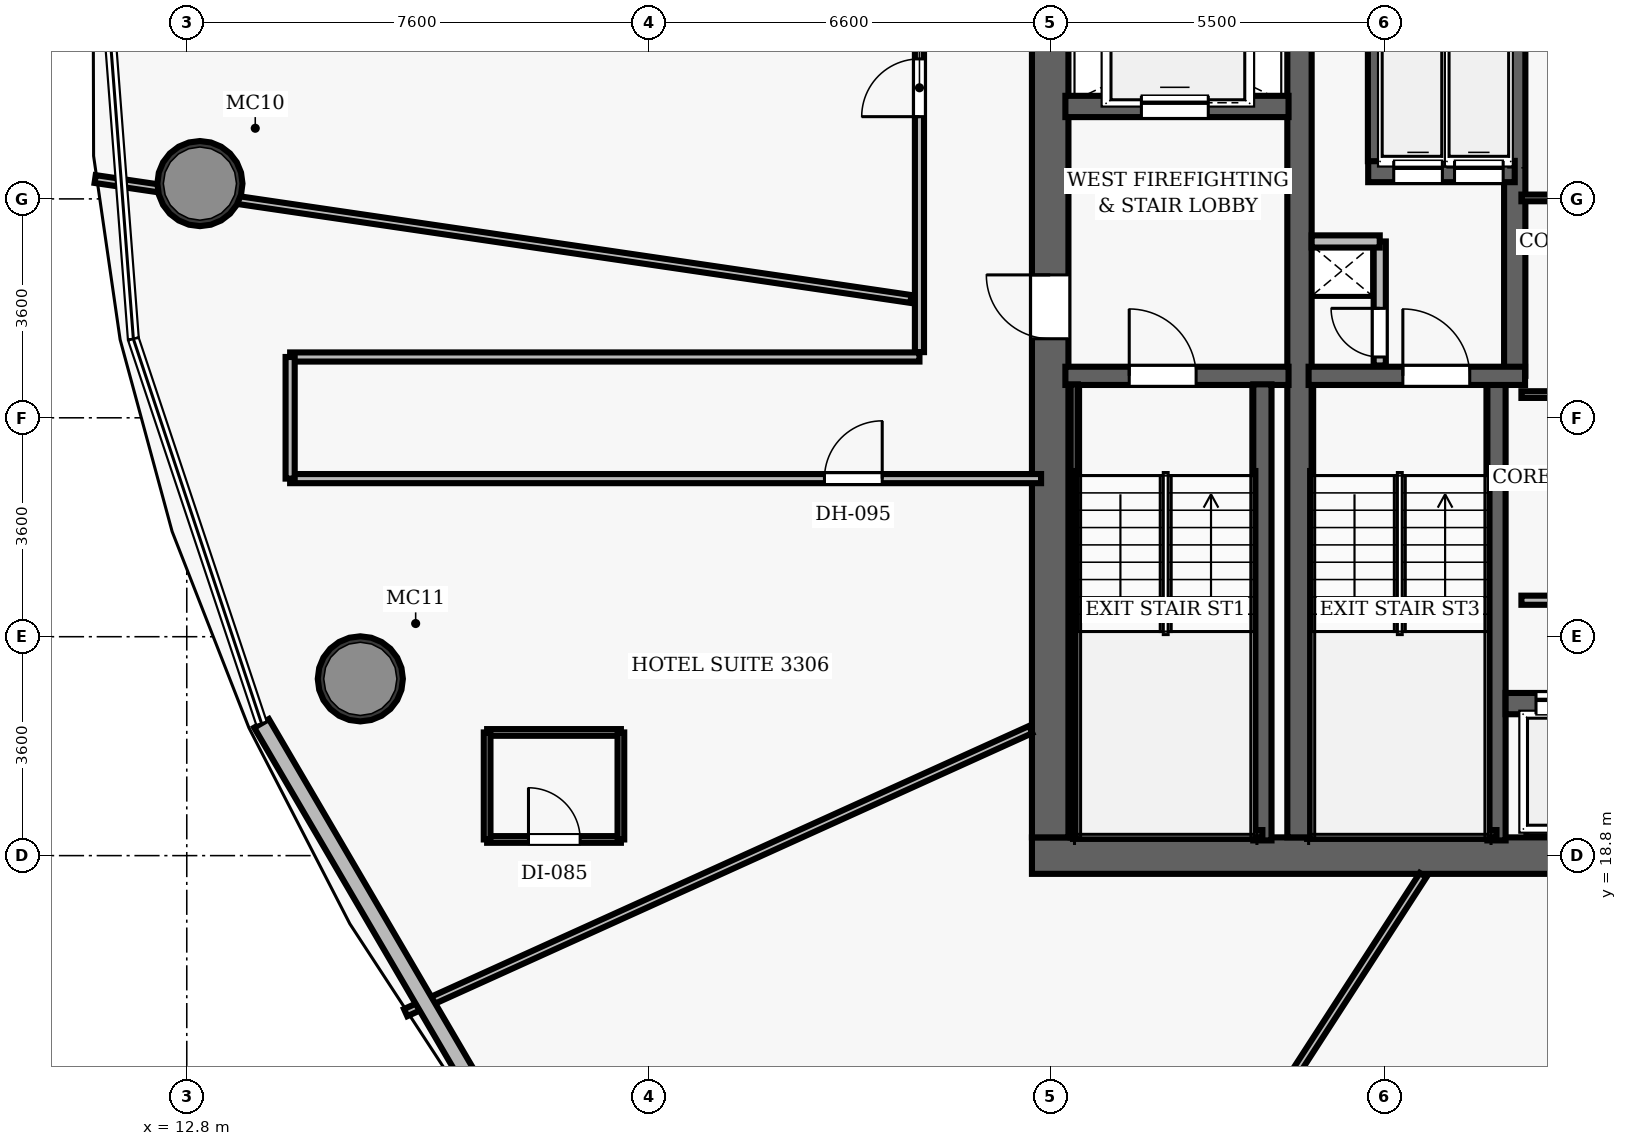
"""IFC4 building model, lengths in metres.
Left out: names, types, materials, properties, quantities, classifications, styles, units other than length and angle.
Written with IfcOpenShell. Run it as: python <this file> out.ifc"""

import sys

from ifc_helpers import new_model, si_unit, direction, frame, frame_2d, origin, origin_2d, place, context, subcontext, project, spatial, rectangle, hollow_circle, extrude, element, fill, save


model = new_model("IFC4")
c1 = context("Model", 3, precision=1e-05, world=origin(), true_north=direction((0.0, 1.0)))
c2 = subcontext(c1, "Body", "Model", "MODEL_VIEW")
j1 = project(units=[si_unit("LENGTHUNIT", "METRE"), si_unit("PLANEANGLEUNIT", "RADIAN")], contexts=[c1])
p1 = place(None, origin())
s1 = spatial("IfcSite", under=j1, at=p1, CompositionType="ELEMENT")
p2 = place(p1, origin())
s2 = spatial("IfcBuilding", under=s1, at=p2, CompositionType="ELEMENT")
p3 = place(p2, frame((0.0, 0.0, 134.3)))
s3 = spatial("IfcBuildingStorey", under=s2, at=p3, CompositionType="ELEMENT", Elevation=134.3)
p4 = place(p3, frame((26.7, 18.8, 0.0), z_axis=(0.0, 0.0, 1.0), x_axis=(1.0, 0.0, 0.0)))
e1 = element("IfcWall", 1, at=p4, inside=s3, PredefinedType="SHEAR", context=c2, shape_type="SweptSolid", body=[
    extrude(rectangle(XDim=22.6, YDim=0.6, at=frame_2d((11.3, 0.0))), origin(), (0.0, 0.0, 1.0), 3.5),
])
p5 = place(p4, frame((14.52, 0.0, 0.0)))
e2 = element("IfcOpeningElement", 2, at=p5, cuts=e1, PredefinedType="OPENING", context=c2, shape_type="SweptSolid", body=[
    extrude(rectangle(XDim=1.05, YDim=2.15, at=frame_2d((0.525, 1.075))), frame((0.0, 0.31, 0.0), z_axis=(0.0, -1.0, 0.0), x_axis=(1.0, 0.0, 0.0)), (0.0, 0.0, 1.0), 0.62),
])
p6 = place(p3, frame((27.0, 19.1, 0.0), z_axis=(0.0, 0.0, 1.0), x_axis=(0.0, 1.0, 0.0)))
e3 = element("IfcWall", 3, at=p6, inside=s3, PredefinedType="SHEAR", context=c2, shape_type="SweptSolid", body=[
    extrude(rectangle(XDim=13.8, YDim=0.6, at=frame_2d((6.9, 0.0))), origin(), (0.0, 0.0, 1.0), 3.5),
])
p7 = place(p6, frame((8.2, 0.0, 0.0)))
e4 = element("IfcOpeningElement", 4, at=p7, cuts=e3, PredefinedType="OPENING", context=c2, shape_type="SweptSolid", body=[
    extrude(rectangle(XDim=1.05, YDim=2.15, at=frame_2d((0.525, 1.075))), frame((0.0, 0.31, 0.0), z_axis=(0.0, -1.0, 0.0), x_axis=(1.0, 0.0, 0.0)), (0.0, 0.0, 1.0), 0.62),
])
p8 = place(p3, frame((31.1, 19.1, 0.0), z_axis=(0.0, 0.0, 1.0), x_axis=(0.0, 1.0, 0.0)))
e5 = element("IfcWall", 5, at=p8, inside=s3, PredefinedType="SHEAR", context=c2, shape_type="SweptSolid", body=[
    extrude(rectangle(XDim=13.8, YDim=0.4, at=frame_2d((6.9, 0.0))), origin(), (0.0, 0.0, 1.0), 3.5),
])
for number, where, z_axis, x_axis in (
    (6, (13.016, 29.852, 0.0), (0.0, 0.0, 1.0), (1.0, 0.0, 0.0)),
    (7, (15.654, 21.707, 0.0), (0.0, 0.0, 1.0), (1.0, 0.0, 0.0)),
):
    element("IfcColumn", number, at=place(p3, frame(where, z_axis=z_axis, x_axis=x_axis)), inside=s3, PredefinedType="COLUMN", context=c2, shape_type="SweptSolid", body=[
        extrude(hollow_circle(Radius=0.7, WallThickness=0.055, at=origin_2d()), origin(), (0.0, 0.0, 1.0), 3.5),
    ])
p9 = place(p3, frame((27.25, 26.69, 0.0), z_axis=(0.0, 0.0, 1.0), x_axis=(1.0, 0.0, 0.0)))
e8 = element("IfcWall", 8, at=p9, inside=s3, PredefinedType="SHEAR", context=c2, shape_type="SweptSolid", body=[
    extrude(rectangle(XDim=3.67, YDim=0.3, at=frame_2d((1.835, 0.0))), origin(), (0.0, 0.0, 1.0), 3.5),
])
p10 = place(p9, frame((1.05, 0.0, 0.0)))
e9 = element("IfcOpeningElement", 9, at=p10, cuts=e8, PredefinedType="OPENING", context=c2, shape_type="SweptSolid", body=[
    extrude(rectangle(XDim=1.1, YDim=2.15, at=frame_2d((0.55, 1.075))), frame((0.0, 0.16, 0.0), z_axis=(0.0, -1.0, 0.0), x_axis=(1.0, 0.0, 0.0)), (0.0, 0.0, 1.0), 0.32),
])
p11 = place(p3, frame((30.49, 19.05, 0.0), z_axis=(0.0, 0.0, 1.0), x_axis=(0.0, 1.0, 0.0)))
e10 = element("IfcWall", 10, at=p11, inside=s3, PredefinedType="SHEAR", context=c2, shape_type="SweptSolid", body=[
    extrude(rectangle(XDim=7.5, YDim=0.3, at=frame_2d((3.75, 0.0))), origin(), (0.0, 0.0, 1.0), 3.5),
])
p12 = place(p3, frame((27.395, 19.1, 0.0), z_axis=(0.0, 0.0, 1.0), x_axis=(0.0, 1.0, 0.0)))
e11 = element("IfcWall", 11, at=p12, inside=s3, PredefinedType="SHEAR", context=c2, shape_type="SweptSolid", body=[
    extrude(rectangle(XDim=7.45, YDim=0.12, at=frame_2d((3.725, 0.0))), origin(), (0.0, 0.0, 1.0), 3.5),
])
p13 = place(p3, frame((27.395, 19.16, 0.0), z_axis=(0.0, 0.0, 1.0), x_axis=(1.0, 0.0, 0.0)))
e12 = element("IfcWall", 12, at=p13, inside=s3, PredefinedType="SHEAR", context=c2, shape_type="SweptSolid", body=[
    extrude(rectangle(XDim=3.095, YDim=0.12, at=frame_2d((1.547, 0.0))), origin(), (0.0, 0.0, 1.0), 3.5),
])
p14 = place(p3, frame((27.25, 31.12, 0.0), z_axis=(0.0, 0.0, 1.0), x_axis=(1.0, 0.0, 0.0)))
e13 = element("IfcWall", 13, at=p14, inside=s3, PredefinedType="SHEAR", context=c2, shape_type="SweptSolid", body=[
    extrude(rectangle(XDim=3.67, YDim=0.35, at=frame_2d((1.835, 0.0))), origin(), (0.0, 0.0, 1.0), 2.675),
])
p15 = place(p14, frame((1.25, 0.0, 0.0)))
e14 = element("IfcOpeningElement", 14, at=p15, cuts=e13, PredefinedType="OPENING", context=c2, shape_type="SweptSolid", body=[
    extrude(rectangle(XDim=1.1, YDim=2.15, at=frame_2d((0.55, 1.075))), frame((0.0, 0.185, 0.0), z_axis=(0.0, -1.0, 0.0), x_axis=(1.0, 0.0, 0.0)), (0.0, 0.0, 1.0), 0.37),
])
p16 = place(p3, frame((34.34, 19.05, 0.0), z_axis=(0.0, 0.0, 1.0), x_axis=(0.0, 1.0, 0.0)))
e15 = element("IfcWall", 15, at=p16, inside=s3, PredefinedType="SHEAR", context=c2, shape_type="SweptSolid", body=[
    extrude(rectangle(XDim=7.5, YDim=0.3, at=frame_2d((3.75, 0.0))), origin(), (0.0, 0.0, 1.0), 3.5),
])
p17 = place(p3, frame((34.64, 26.69, 0.0), z_axis=(0.0, 0.0, 1.0), x_axis=(0.0, 1.0, 0.0)))
e16 = element("IfcWall", 16, at=p17, inside=s3, PredefinedType="SHEAR", context=c2, shape_type="SweptSolid", body=[
    extrude(rectangle(XDim=6.26, YDim=0.35, at=frame_2d((3.13, 0.0))), origin(), (0.0, 0.0, 1.0), 3.5),
])
p18 = place(p3, frame((31.25, 26.69, 0.0), z_axis=(0.0, 0.0, 1.0), x_axis=(1.0, 0.0, 0.0)))
e17 = element("IfcWall", 17, at=p18, inside=s3, PredefinedType="SHEAR", context=c2, shape_type="SweptSolid", body=[
    extrude(rectangle(XDim=3.56, YDim=0.3, at=frame_2d((1.78, 0.0))), origin(), (0.0, 0.0, 1.0), 3.5),
])
p19 = place(p18, frame((1.55, 0.0, 0.0)))
e18 = element("IfcOpeningElement", 18, at=p19, cuts=e17, PredefinedType="OPENING", context=c2, shape_type="SweptSolid", body=[
    extrude(rectangle(XDim=1.1, YDim=2.15, at=frame_2d((0.55, 1.075))), frame((0.0, 0.16, 0.0), z_axis=(0.0, -1.0, 0.0), x_axis=(1.0, 0.0, 0.0)), (0.0, 0.0, 1.0), 0.32),
])
p20 = place(p3, frame((31.3, 19.16, 0.0), z_axis=(0.0, 0.0, 1.0), x_axis=(1.0, 0.0, 0.0)))
e19 = element("IfcWall", 19, at=p20, inside=s3, PredefinedType="SHEAR", context=c2, shape_type="SweptSolid", body=[
    extrude(rectangle(XDim=3.04, YDim=0.12, at=frame_2d((1.52, 0.0))), origin(), (0.0, 0.0, 1.0), 3.5),
])
p21 = place(p3, frame((32.23, 30.05, 0.0), z_axis=(0.0, 0.0, 1.0), x_axis=(1.0, 0.0, 0.0)))
e20 = element("IfcWall", 20, at=p21, inside=s3, PredefinedType="SHEAR", context=c2, shape_type="SweptSolid", body=[
    extrude(rectangle(XDim=2.41, YDim=0.35, at=frame_2d((1.205, 0.0))), origin(), (0.0, 0.0, 1.0), 2.675),
])
p22 = place(p21, frame((0.42, 0.0, 0.0)))
e21 = element("IfcOpeningElement", 21, at=p22, cuts=e20, PredefinedType="OPENING", context=c2, shape_type="SweptSolid", body=[
    extrude(rectangle(XDim=0.8, YDim=2.15, at=frame_2d((0.4, 1.075))), frame((0.0, 0.185, 0.0), z_axis=(0.0, -1.0, 0.0), x_axis=(1.0, 0.0, 0.0)), (0.0, 0.0, 1.0), 0.37),
])
p23 = place(p21, frame((1.42, 0.0, 0.0)))
e22 = element("IfcOpeningElement", 22, at=p23, cuts=e20, PredefinedType="OPENING", context=c2, shape_type="SweptSolid", body=[
    extrude(rectangle(XDim=0.8, YDim=2.15, at=frame_2d((0.4, 1.075))), frame((0.0, 0.185, 0.0), z_axis=(0.0, -1.0, 0.0), x_axis=(1.0, 0.0, 0.0)), (0.0, 0.0, 1.0), 0.37),
])
p24 = place(p3, frame((32.4, 30.22, 0.0), z_axis=(0.0, 0.0, 1.0), x_axis=(0.0, 1.0, 0.0)))
e23 = element("IfcWall", 23, at=p24, inside=s3, PredefinedType="SHEAR", context=c2, shape_type="SweptSolid", body=[
    extrude(rectangle(XDim=2.73, YDim=0.35, at=frame_2d((1.365, 0.0))), origin(), (0.0, 0.0, 1.0), 2.675),
])
p25 = place(p3, frame((32.42, 26.86, 0.0), z_axis=(0.0, 0.0, 1.0), x_axis=(0.0, 1.0, 0.0)))
e24 = element("IfcWall", 24, at=p25, inside=s3, PredefinedType="PARTITIONING", context=c2, shape_type="SweptSolid", body=[
    extrude(rectangle(XDim=2.04, YDim=0.2, at=frame_2d((1.02, 0.0))), origin(), (0.0, 0.0, 1.0), 2.675),
])
p26 = place(p25, frame((0.14, 0.0, 0.0)))
e25 = element("IfcOpeningElement", 25, at=p26, cuts=e24, PredefinedType="OPENING", context=c2, shape_type="SweptSolid", body=[
    extrude(rectangle(XDim=0.8, YDim=2.05, at=frame_2d((0.4, 1.025))), frame((0.0, 0.11, 0.0), z_axis=(0.0, -1.0, 0.0), x_axis=(1.0, 0.0, 0.0)), (0.0, 0.0, 1.0), 0.22),
])
p27 = place(p3, frame((31.3, 28.9, 0.0), z_axis=(0.0, 0.0, 1.0), x_axis=(1.0, 0.0, 0.0)))
e26 = element("IfcWall", 26, at=p27, inside=s3, PredefinedType="PARTITIONING", context=c2, shape_type="SweptSolid", body=[
    extrude(rectangle(XDim=1.12, YDim=0.2, at=frame_2d((0.56, 0.0))), origin(), (0.0, 0.0, 1.0), 2.675),
])
p28 = place(p3, frame((34.49, 21.3, 0.0), z_axis=(0.0, 0.0, 1.0), x_axis=(1.0, 0.0, 0.0)))
e27 = element("IfcWall", 27, at=p28, inside=s3, PredefinedType="SHEAR", context=c2, shape_type="SweptSolid", body=[
    extrude(rectangle(XDim=6.68, YDim=0.35, at=frame_2d((3.34, 0.0))), origin(), (0.0, 0.0, 1.0), 2.675),
])
p29 = place(p28, frame((0.5, 0.0, 0.0)))
e28 = element("IfcOpeningElement", 28, at=p29, cuts=e27, PredefinedType="OPENING", context=c2, shape_type="SweptSolid", body=[
    extrude(rectangle(XDim=0.9, YDim=2.15, at=frame_2d((0.45, 1.075))), frame((0.0, 0.185, 0.0), z_axis=(0.0, -1.0, 0.0), x_axis=(1.0, 0.0, 0.0)), (0.0, 0.0, 1.0), 0.37),
])
p30 = place(p28, frame((2.58, 0.0, 0.0)))
e29 = element("IfcOpeningElement", 29, at=p30, cuts=e27, PredefinedType="OPENING", context=c2, shape_type="SweptSolid", body=[
    extrude(rectangle(XDim=0.9, YDim=2.15, at=frame_2d((0.45, 1.075))), frame((0.0, 0.185, 0.0), z_axis=(0.0, -1.0, 0.0), x_axis=(1.0, 0.0, 0.0)), (0.0, 0.0, 1.0), 0.37),
])
p31 = place(p28, frame((4.66, 0.0, 0.0)))
e30 = element("IfcOpeningElement", 30, at=p31, cuts=e27, PredefinedType="OPENING", context=c2, shape_type="SweptSolid", body=[
    extrude(rectangle(XDim=0.9, YDim=2.15, at=frame_2d((0.45, 1.075))), frame((0.0, 0.185, 0.0), z_axis=(0.0, -1.0, 0.0), x_axis=(1.0, 0.0, 0.0)), (0.0, 0.0, 1.0), 0.37),
])
p32 = place(p3, frame((34.75, 23.0, 0.0), z_axis=(0.0, 0.0, 1.0), x_axis=(1.0, 0.0, 0.0)))
e31 = element("IfcWall", 31, at=p32, inside=s3, PredefinedType="PARTITIONING", context=c2, shape_type="SweptSolid", body=[
    extrude(rectangle(XDim=6.25, YDim=0.15, at=frame_2d((3.125, 0.0))), origin(), (0.0, 0.0, 1.0), 2.675),
])
for number, where, z_axis, x_axis in (
    (32, (34.75, 26.382, 0.0), (0.0, 0.0, 1.0), (1.0, 0.0, 0.0)),
    (33, (34.75, 29.616, 0.0), (0.0, 0.0, 1.0), (1.0, 0.0, 0.0)),
):
    element("IfcWall", number, at=place(p3, frame(where, z_axis=z_axis, x_axis=x_axis)), inside=s3, PredefinedType="PARTITIONING", context=c2, shape_type="SweptSolid", body=[
        extrude(rectangle(XDim=6.25, YDim=0.11, at=frame_2d((3.125, 0.0))), origin(), (0.0, 0.0, 1.0), 2.675),
    ])
p33 = place(p3, frame((24.85, 27.08, 0.0), z_axis=(0.0, 0.0, 1.0), x_axis=(0.0, 1.0, 0.0)))
e34 = element("IfcWall", 34, at=p33, inside=s3, PredefinedType="PARTITIONING", context=c2, shape_type="SweptSolid", body=[
    extrude(rectangle(XDim=8.12, YDim=0.15, at=frame_2d((4.06, 0.0))), origin(), (0.0, 0.0, 1.0), 2.675),
])
p34 = place(p33, frame((3.872, 0.0, 0.0)))
e35 = element("IfcOpeningElement", 35, at=p34, cuts=e34, PredefinedType="OPENING", context=c2, shape_type="SweptSolid", body=[
    extrude(rectangle(XDim=0.95, YDim=2.15, at=frame_2d((0.475, 1.075))), frame((0.0, 0.085, 0.0), z_axis=(0.0, -1.0, 0.0), x_axis=(1.0, 0.0, 0.0)), (0.0, 0.0, 1.0), 0.17),
])
p35 = place(p3, frame((14.5, 27.0, 0.0), z_axis=(0.0, 0.0, 1.0), x_axis=(1.0, 0.0, 0.0)))
e36 = element("IfcWall", 36, at=p35, inside=s3, PredefinedType="PARTITIONING", context=c2, shape_type="SweptSolid", body=[
    extrude(rectangle(XDim=10.35, YDim=0.15, at=frame_2d((5.175, 0.0))), origin(), (0.0, 0.0, 1.0), 2.675),
])
p36 = place(p3, frame((14.5, 25.0, 0.0), z_axis=(0.0, 0.0, 1.0), x_axis=(1.0, 0.0, 0.0)))
e37 = element("IfcWall", 37, at=p36, inside=s3, PredefinedType="PARTITIONING", context=c2, shape_type="SweptSolid", body=[
    extrude(rectangle(XDim=12.35, YDim=0.15, at=frame_2d((6.175, 0.0))), origin(), (0.0, 0.0, 1.0), 2.675),
])
p37 = place(p36, frame((8.788, 0.0, 0.0)))
e38 = element("IfcOpeningElement", 38, at=p37, cuts=e37, PredefinedType="OPENING", context=c2, shape_type="SweptSolid", body=[
    extrude(rectangle(XDim=0.95, YDim=2.15, at=frame_2d((0.475, 1.075))), frame((0.0, 0.085, 0.0), z_axis=(0.0, -1.0, 0.0), x_axis=(1.0, 0.0, 0.0)), (0.0, 0.0, 1.0), 0.17),
])
p38 = place(p3, frame((14.5, 25.0, 0.0), z_axis=(0.0, 0.0, 1.0), x_axis=(0.0, 1.0, 0.0)))
e39 = element("IfcWall", 39, at=p38, inside=s3, PredefinedType="PARTITIONING", context=c2, shape_type="SweptSolid", body=[
    extrude(rectangle(XDim=2.0, YDim=0.15, at=frame_2d((1.0, 0.0))), origin(), (0.0, 0.0, 1.0), 2.675),
])
p39 = place(p3, frame((24.71, 27.954, 0.0), z_axis=(0.0, 0.0, 1.0), x_axis=(-0.989363707992, 0.145462893234, 0.0)))
e40 = element("IfcWall", 40, at=p39, inside=s3, PredefinedType="PARTITIONING", context=c2, shape_type="SweptSolid", body=[
    extrude(rectangle(XDim=13.561, YDim=0.13, at=frame_2d((6.781, 0.0))), origin(), (0.0, 0.0, 1.0), 2.675),
])
p40 = place(p3, frame((26.68, 20.874, 0.0), z_axis=(0.0, 0.0, 1.0), x_axis=(-0.910944210003, -0.412529570166, 0.0)))
e41 = element("IfcWall", 41, at=p40, inside=s3, PredefinedType="PARTITIONING", context=c2, shape_type="SweptSolid", body=[
    extrude(rectangle(XDim=11.285, YDim=0.13, at=frame_2d((5.643, 0.0))), origin(), (0.0, 0.0, 1.0), 2.675),
])
p41 = place(p3, frame((33.133, 18.48, 0.0), z_axis=(0.0, 0.0, 1.0), x_axis=(-0.543297694795, -0.839540121037, 0.0)))
e42 = element("IfcWall", 42, at=p41, inside=s3, PredefinedType="PARTITIONING", context=c2, shape_type="SweptSolid", body=[
    extrude(rectangle(XDim=13.957, YDim=0.13, at=frame_2d((6.979, 0.0))), origin(), (0.0, 0.0, 1.0), 2.675),
])
p42 = place(p3, frame((17.74, 19.066, 0.0), z_axis=(0.0, 0.0, 1.0), x_axis=(1.0, 0.0, 0.0)))
e43 = element("IfcWall", 43, at=p42, inside=s3, PredefinedType="PARTITIONING", context=c2, shape_type="SweptSolid", body=[
    extrude(rectangle(XDim=2.2, YDim=0.11, at=frame_2d((1.1, 0.0))), origin(), (0.0, 0.0, 1.0), 2.675),
])
p43 = place(p42, frame((0.68, 0.0, 0.0)))
e44 = element("IfcOpeningElement", 44, at=p43, cuts=e43, PredefinedType="OPENING", context=c2, shape_type="SweptSolid", body=[
    extrude(rectangle(XDim=0.85, YDim=2.1, at=frame_2d((0.425, 1.05))), frame((0.0, 0.065, 0.0), z_axis=(0.0, -1.0, 0.0), x_axis=(1.0, 0.0, 0.0)), (0.0, 0.0, 1.0), 0.13),
])
p44 = place(p3, frame((17.74, 20.826, 0.0), z_axis=(0.0, 0.0, 1.0), x_axis=(1.0, 0.0, 0.0)))
e45 = element("IfcWall", 45, at=p44, inside=s3, PredefinedType="PARTITIONING", context=c2, shape_type="SweptSolid", body=[
    extrude(rectangle(XDim=2.2, YDim=0.11, at=frame_2d((1.1, 0.0))), origin(), (0.0, 0.0, 1.0), 2.675),
])
for number, where, z_axis, x_axis in (
    (46, (17.74, 19.066, 0.0), (0.0, 0.0, 1.0), (0.0, 1.0, 0.0)),
    (47, (19.94, 19.066, 0.0), (0.0, 0.0, 1.0), (0.0, 1.0, 0.0)),
):
    element("IfcWall", number, at=place(p3, frame(where, z_axis=z_axis, x_axis=x_axis)), inside=s3, PredefinedType="PARTITIONING", context=c2, shape_type="SweptSolid", body=[
        extrude(rectangle(XDim=1.76, YDim=0.11, at=frame_2d((0.88, 0.0))), origin(), (0.0, 0.0, 1.0), 2.675),
    ])
p45 = place(p3, frame((17.711, 14.681, 0.0), z_axis=(0.0, 0.0, 1.0), x_axis=(-0.504896965015, 0.863179619036, 0.0)))
e48 = element("IfcWall", 48, at=p45, inside=s3, PredefinedType="SOLIDWALL", context=c2, shape_type="SweptSolid", body=[
    extrude(rectangle(XDim=7.292, YDim=0.28, at=frame_2d((3.646, 0.0))), origin(), (0.0, 0.0, 1.0), 3.26),
])
p46 = place(p10, origin())
e49 = element("IfcDoor", 49, at=p46, inside=s3, OperationType="SINGLE_SWING_LEFT", PredefinedType="DOOR", context=c2, shape_type="SweptSolid", body=[
    extrude(rectangle(XDim=1.1, YDim=2.15, at=frame_2d((0.55, 1.075))), frame((0.0, 0.025, 0.0), z_axis=(0.0, -1.0, 0.0), x_axis=(1.0, 0.0, 0.0)), (0.0, 0.0, 1.0), 0.05),
])
fill(e9, e49)
p47 = place(p7, origin())
e50 = element("IfcDoor", 50, at=p47, inside=s3, OperationType="SINGLE_SWING_RIGHT", PredefinedType="DOOR", context=c2, shape_type="SweptSolid", body=[
    extrude(rectangle(XDim=1.05, YDim=2.15, at=frame_2d((0.525, 1.075))), frame((0.0, 0.025, 0.0), z_axis=(0.0, -1.0, 0.0), x_axis=(1.0, 0.0, 0.0)), (0.0, 0.0, 1.0), 0.05),
])
fill(e4, e50)
p48 = place(p19, origin())
e51 = element("IfcDoor", 51, at=p48, inside=s3, OperationType="SINGLE_SWING_LEFT", PredefinedType="DOOR", context=c2, shape_type="SweptSolid", body=[
    extrude(rectangle(XDim=1.1, YDim=2.15, at=frame_2d((0.55, 1.075))), frame((0.0, 0.025, 0.0), z_axis=(0.0, -1.0, 0.0), x_axis=(1.0, 0.0, 0.0)), (0.0, 0.0, 1.0), 0.05),
])
fill(e18, e51)
p49 = place(p26, origin())
e52 = element("IfcDoor", 52, at=p49, inside=s3, OperationType="SINGLE_SWING_RIGHT", PredefinedType="DOOR", context=c2, shape_type="SweptSolid", body=[
    extrude(rectangle(XDim=0.8, YDim=2.05, at=frame_2d((0.4, 1.025))), frame((0.0, 0.025, 0.0), z_axis=(0.0, -1.0, 0.0), x_axis=(1.0, 0.0, 0.0)), (0.0, 0.0, 1.0), 0.05),
])
fill(e25, e52)
p50 = place(p34, origin())
e53 = element("IfcDoor", 53, at=p50, inside=s3, OperationType="SINGLE_SWING_LEFT", PredefinedType="DOOR", context=c2, shape_type="SweptSolid", body=[
    extrude(rectangle(XDim=0.95, YDim=2.15, at=frame_2d((0.475, 1.075))), frame((0.0, 0.025, 0.0), z_axis=(0.0, -1.0, 0.0), x_axis=(1.0, 0.0, 0.0)), (0.0, 0.0, 1.0), 0.05),
])
fill(e35, e53)
p51 = place(p37, origin())
e54 = element("IfcDoor", 54, at=p51, inside=s3, OperationType="SINGLE_SWING_RIGHT", PredefinedType="DOOR", context=c2, shape_type="SweptSolid", body=[
    extrude(rectangle(XDim=0.95, YDim=2.15, at=frame_2d((0.475, 1.075))), frame((0.0, 0.025, 0.0), z_axis=(0.0, -1.0, 0.0), x_axis=(1.0, 0.0, 0.0)), (0.0, 0.0, 1.0), 0.05),
])
fill(e38, e54)
p52 = place(p43, origin())
e55 = element("IfcDoor", 55, at=p52, inside=s3, OperationType="SINGLE_SWING_LEFT", PredefinedType="DOOR", context=c2, shape_type="SweptSolid", body=[
    extrude(rectangle(XDim=0.85, YDim=2.1, at=frame_2d((0.425, 1.05))), frame((0.0, 0.025, 0.0), z_axis=(0.0, -1.0, 0.0), x_axis=(1.0, 0.0, 0.0)), (0.0, 0.0, 1.0), 0.05),
])
fill(e44, e55)
p53 = place(p29, origin())
e56 = element("IfcDoor", 56, at=p53, inside=s3, OperationType="SLIDING_TO_LEFT", PredefinedType="DOOR", context=c2, shape_type="SweptSolid", body=[
    extrude(rectangle(XDim=0.9, YDim=2.15, at=frame_2d((0.45, 1.075))), frame((0.0, 0.025, 0.0), z_axis=(0.0, -1.0, 0.0), x_axis=(1.0, 0.0, 0.0)), (0.0, 0.0, 1.0), 0.05),
])
fill(e28, e56)
p54 = place(p15, origin())
e57 = element("IfcDoor", 57, at=p54, inside=s3, OperationType="SLIDING_TO_LEFT", PredefinedType="DOOR", context=c2, shape_type="SweptSolid", body=[
    extrude(rectangle(XDim=1.1, YDim=2.15, at=frame_2d((0.55, 1.075))), frame((0.0, 0.025, 0.0), z_axis=(0.0, -1.0, 0.0), x_axis=(1.0, 0.0, 0.0)), (0.0, 0.0, 1.0), 0.05),
])
fill(e14, e57)
p55 = place(p22, origin())
e58 = element("IfcDoor", 58, at=p55, inside=s3, OperationType="SLIDING_TO_LEFT", PredefinedType="DOOR", context=c2, shape_type="SweptSolid", body=[
    extrude(rectangle(XDim=0.8, YDim=2.15, at=frame_2d((0.4, 1.075))), frame((0.0, 0.025, 0.0), z_axis=(0.0, -1.0, 0.0), x_axis=(1.0, 0.0, 0.0)), (0.0, 0.0, 1.0), 0.05),
])
fill(e21, e58)
p56 = place(p23, origin())
e59 = element("IfcDoor", 59, at=p56, inside=s3, OperationType="SLIDING_TO_LEFT", PredefinedType="DOOR", context=c2, shape_type="SweptSolid", body=[
    extrude(rectangle(XDim=0.8, YDim=2.15, at=frame_2d((0.4, 1.075))), frame((0.0, 0.025, 0.0), z_axis=(0.0, -1.0, 0.0), x_axis=(1.0, 0.0, 0.0)), (0.0, 0.0, 1.0), 0.05),
])
fill(e22, e59)
save(model, sys.argv[1])
